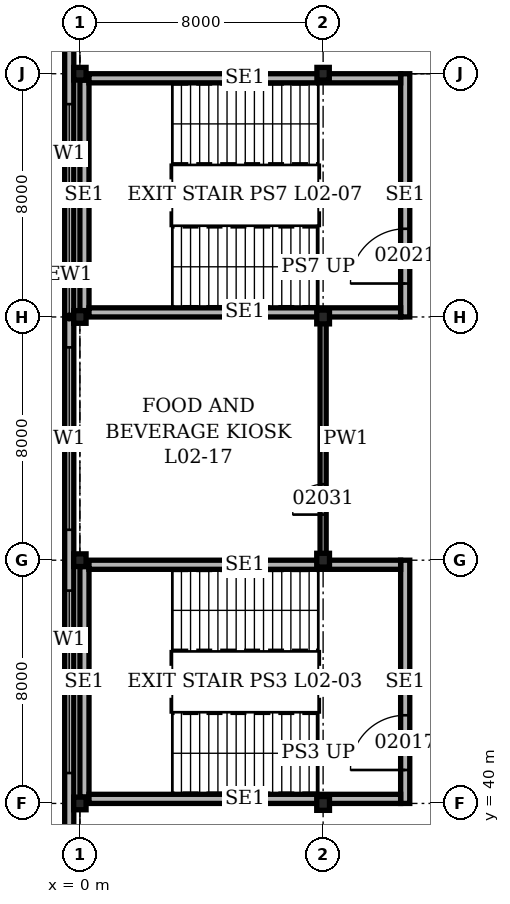
"""IFC4 building model, lengths in metres.
Left out: names, types, materials, properties, quantities, classifications, styles, units other than length and angle.
Written with IfcOpenShell. Run it as: python <this file> out.ifc"""

import sys

from ifc_helpers import new_model, si_unit, direction, frame, frame_2d, origin, origin_2d, place, context, subcontext, project, spatial, rectangle, i_section, extrude, element, fill, save


model = new_model("IFC4")
c1 = context("Model", 3, precision=1e-05, world=origin(), true_north=direction((0.0, 1.0)))
c2 = subcontext(c1, "Body", "Model", "MODEL_VIEW")
j1 = project(units=[si_unit("LENGTHUNIT", "METRE"), si_unit("PLANEANGLEUNIT", "RADIAN")], contexts=[c1])
p1 = place(None, origin())
s1 = spatial("IfcSite", under=j1, at=p1, CompositionType="ELEMENT")
p2 = place(p1, origin())
s2 = spatial("IfcBuilding", under=s1, at=p2, CompositionType="ELEMENT")
p3 = place(p2, frame((0.0, 0.0, 9.9)))
s3 = spatial("IfcBuildingStorey", under=s2, at=p3, CompositionType="ELEMENT", Elevation=9.9)
for number, where, z_axis, x_axis in (
    (1, (0.0, 40.0, 0.0), (0.0, 0.0, 1.0), (1.0, 0.0, 0.0)),
    (2, (0.0, 48.0, 0.0), (0.0, 0.0, 1.0), (1.0, 0.0, 0.0)),
    (3, (0.0, 56.0, 0.0), (0.0, 0.0, 1.0), (1.0, 0.0, 0.0)),
    (4, (0.0, 64.0, 0.0), (0.0, 0.0, 1.0), (1.0, 0.0, 0.0)),
):
    element("IfcColumn", number, at=place(p3, frame(where, z_axis=z_axis, x_axis=x_axis)), inside=s3, PredefinedType="COLUMN", context=c2, shape_type="SweptSolid", body=[
        extrude(i_section(OverallWidth=0.406, OverallDepth=0.417, WebThickness=0.03, FlangeThickness=0.048, at=origin_2d()), origin(), (0.0, 0.0, 1.0), 5.0),
    ])
for number, where, z_axis, x_axis in (
    (5, (8.0, 40.0, 0.0), (0.0, 0.0, 1.0), (1.0, 0.0, 0.0)),
    (6, (8.0, 48.0, 0.0), (0.0, 0.0, 1.0), (1.0, 0.0, 0.0)),
    (7, (8.0, 56.0, 0.0), (0.0, 0.0, 1.0), (1.0, 0.0, 0.0)),
):
    element("IfcColumn", number, at=place(p3, frame(where, z_axis=z_axis, x_axis=x_axis)), inside=s3, PredefinedType="COLUMN", context=c2, shape_type="SweptSolid", body=[
        extrude(i_section(OverallWidth=0.419, OverallDepth=0.455, WebThickness=0.042, FlangeThickness=0.068, at=origin_2d()), origin(), (0.0, 0.0, 1.0), 5.0),
    ])
p4 = place(p3, frame((8.0, 64.0, 0.0), z_axis=(0.0, 0.0, 1.0), x_axis=(1.0, 0.0, 0.0)))
e8 = element("IfcColumn", 8, at=p4, inside=s3, PredefinedType="COLUMN", context=c2, shape_type="SweptSolid", body=[
    extrude(i_section(OverallWidth=0.406, OverallDepth=0.417, WebThickness=0.03, FlangeThickness=0.048, at=origin_2d()), origin(), (0.0, 0.0, 1.0), 5.0),
])
p5 = place(p3, frame((-0.35, 112.35, 0.0), z_axis=(0.0, 0.0, 1.0), x_axis=(0.0, -1.0, 0.0)))
e9 = element("IfcWall", 9, at=p5, inside=s3, PredefinedType="SOLIDWALL", context=c2, shape_type="SweptSolid", body=[
    extrude(rectangle(XDim=112.7, YDim=0.3, at=frame_2d((56.35, 0.0))), origin(), (0.0, 0.0, 1.0), 5.0),
])
p6 = place(p5, frame((1.35, 0.0, 1.0)))
e10 = element("IfcOpeningElement", 10, at=p6, cuts=e9, PredefinedType="OPENING", context=c2, shape_type="SweptSolid", body=[
    extrude(rectangle(XDim=6.0, YDim=1.5, at=frame_2d((3.0, 0.75))), frame((0.0, 0.16, 0.0), z_axis=(0.0, -1.0, 0.0), x_axis=(1.0, 0.0, 0.0)), (0.0, 0.0, 1.0), 0.32),
])
p7 = place(p5, frame((9.35, 0.0, 1.0)))
e11 = element("IfcOpeningElement", 11, at=p7, cuts=e9, PredefinedType="OPENING", context=c2, shape_type="SweptSolid", body=[
    extrude(rectangle(XDim=6.0, YDim=1.5, at=frame_2d((3.0, 0.75))), frame((0.0, 0.16, 0.0), z_axis=(0.0, -1.0, 0.0), x_axis=(1.0, 0.0, 0.0)), (0.0, 0.0, 1.0), 0.32),
])
p8 = place(p5, frame((17.35, 0.0, 1.0)))
e12 = element("IfcOpeningElement", 12, at=p8, cuts=e9, PredefinedType="OPENING", context=c2, shape_type="SweptSolid", body=[
    extrude(rectangle(XDim=6.0, YDim=1.5, at=frame_2d((3.0, 0.75))), frame((0.0, 0.16, 0.0), z_axis=(0.0, -1.0, 0.0), x_axis=(1.0, 0.0, 0.0)), (0.0, 0.0, 1.0), 0.32),
])
p9 = place(p5, frame((25.35, 0.0, 1.0)))
e13 = element("IfcOpeningElement", 13, at=p9, cuts=e9, PredefinedType="OPENING", context=c2, shape_type="SweptSolid", body=[
    extrude(rectangle(XDim=6.0, YDim=1.5, at=frame_2d((3.0, 0.75))), frame((0.0, 0.16, 0.0), z_axis=(0.0, -1.0, 0.0), x_axis=(1.0, 0.0, 0.0)), (0.0, 0.0, 1.0), 0.32),
])
p10 = place(p5, frame((33.35, 0.0, 1.0)))
e14 = element("IfcOpeningElement", 14, at=p10, cuts=e9, PredefinedType="OPENING", context=c2, shape_type="SweptSolid", body=[
    extrude(rectangle(XDim=6.0, YDim=1.5, at=frame_2d((3.0, 0.75))), frame((0.0, 0.16, 0.0), z_axis=(0.0, -1.0, 0.0), x_axis=(1.0, 0.0, 0.0)), (0.0, 0.0, 1.0), 0.32),
])
p11 = place(p5, frame((41.35, 0.0, 1.0)))
e15 = element("IfcOpeningElement", 15, at=p11, cuts=e9, PredefinedType="OPENING", context=c2, shape_type="SweptSolid", body=[
    extrude(rectangle(XDim=6.0, YDim=1.5, at=frame_2d((3.0, 0.75))), frame((0.0, 0.16, 0.0), z_axis=(0.0, -1.0, 0.0), x_axis=(1.0, 0.0, 0.0)), (0.0, 0.0, 1.0), 0.32),
])
p12 = place(p5, frame((49.35, 0.0, 1.0)))
e16 = element("IfcOpeningElement", 16, at=p12, cuts=e9, PredefinedType="OPENING", context=c2, shape_type="SweptSolid", body=[
    extrude(rectangle(XDim=6.0, YDim=1.5, at=frame_2d((3.0, 0.75))), frame((0.0, 0.16, 0.0), z_axis=(0.0, -1.0, 0.0), x_axis=(1.0, 0.0, 0.0)), (0.0, 0.0, 1.0), 0.32),
])
p13 = place(p5, frame((57.35, 0.0, 1.0)))
e17 = element("IfcOpeningElement", 17, at=p13, cuts=e9, PredefinedType="OPENING", context=c2, shape_type="SweptSolid", body=[
    extrude(rectangle(XDim=6.0, YDim=1.5, at=frame_2d((3.0, 0.75))), frame((0.0, 0.16, 0.0), z_axis=(0.0, -1.0, 0.0), x_axis=(1.0, 0.0, 0.0)), (0.0, 0.0, 1.0), 0.32),
])
p14 = place(p5, frame((65.35, 0.0, 1.0)))
e18 = element("IfcOpeningElement", 18, at=p14, cuts=e9, PredefinedType="OPENING", context=c2, shape_type="SweptSolid", body=[
    extrude(rectangle(XDim=6.0, YDim=1.5, at=frame_2d((3.0, 0.75))), frame((0.0, 0.16, 0.0), z_axis=(0.0, -1.0, 0.0), x_axis=(1.0, 0.0, 0.0)), (0.0, 0.0, 1.0), 0.32),
])
p15 = place(p5, frame((73.35, 0.0, 1.0)))
e19 = element("IfcOpeningElement", 19, at=p15, cuts=e9, PredefinedType="OPENING", context=c2, shape_type="SweptSolid", body=[
    extrude(rectangle(XDim=6.0, YDim=1.5, at=frame_2d((3.0, 0.75))), frame((0.0, 0.16, 0.0), z_axis=(0.0, -1.0, 0.0), x_axis=(1.0, 0.0, 0.0)), (0.0, 0.0, 1.0), 0.32),
])
p16 = place(p5, frame((81.35, 0.0, 1.0)))
e20 = element("IfcOpeningElement", 20, at=p16, cuts=e9, PredefinedType="OPENING", context=c2, shape_type="SweptSolid", body=[
    extrude(rectangle(XDim=6.0, YDim=1.5, at=frame_2d((3.0, 0.75))), frame((0.0, 0.16, 0.0), z_axis=(0.0, -1.0, 0.0), x_axis=(1.0, 0.0, 0.0)), (0.0, 0.0, 1.0), 0.32),
])
p17 = place(p5, frame((89.35, 0.0, 1.0)))
e21 = element("IfcOpeningElement", 21, at=p17, cuts=e9, PredefinedType="OPENING", context=c2, shape_type="SweptSolid", body=[
    extrude(rectangle(XDim=6.0, YDim=1.5, at=frame_2d((3.0, 0.75))), frame((0.0, 0.16, 0.0), z_axis=(0.0, -1.0, 0.0), x_axis=(1.0, 0.0, 0.0)), (0.0, 0.0, 1.0), 0.32),
])
p18 = place(p5, frame((97.35, 0.0, 1.0)))
e22 = element("IfcOpeningElement", 22, at=p18, cuts=e9, PredefinedType="OPENING", context=c2, shape_type="SweptSolid", body=[
    extrude(rectangle(XDim=6.0, YDim=1.5, at=frame_2d((3.0, 0.75))), frame((0.0, 0.16, 0.0), z_axis=(0.0, -1.0, 0.0), x_axis=(1.0, 0.0, 0.0)), (0.0, 0.0, 1.0), 0.32),
])
p19 = place(p5, frame((105.35, 0.0, 1.0)))
e23 = element("IfcOpeningElement", 23, at=p19, cuts=e9, PredefinedType="OPENING", context=c2, shape_type="SweptSolid", body=[
    extrude(rectangle(XDim=6.0, YDim=1.5, at=frame_2d((3.0, 0.75))), frame((0.0, 0.16, 0.0), z_axis=(0.0, -1.0, 0.0), x_axis=(1.0, 0.0, 0.0)), (0.0, 0.0, 1.0), 0.32),
])
p20 = place(p3, frame((0.15, 40.208, 0.0), z_axis=(0.0, 0.0, 1.0), x_axis=(0.0, 1.0, 0.0)))
e24 = element("IfcWall", 24, at=p20, inside=s3, PredefinedType="SOLIDWALL", context=c2, shape_type="SweptSolid", body=[
    extrude(rectangle(XDim=7.583, YDim=0.3, at=frame_2d((3.792, 0.0))), origin(), (0.0, 0.0, 1.0), 4.8),
])
p21 = place(p3, frame((10.7, 40.0, 0.0), z_axis=(0.0, 0.0, 1.0), x_axis=(0.0, 1.0, 0.0)))
e25 = element("IfcWall", 25, at=p21, inside=s3, PredefinedType="SOLIDWALL", context=c2, shape_type="SweptSolid", body=[
    extrude(rectangle(XDim=8.0, YDim=0.3, at=frame_2d((4.0, 0.0))), origin(), (0.0, 0.0, 1.0), 4.8),
])
p22 = place(p21, frame((1.1, 0.0, 0.0)))
e26 = element("IfcOpeningElement", 26, at=p22, cuts=e25, PredefinedType="OPENING", context=c2, shape_type="SweptSolid", body=[
    extrude(rectangle(XDim=1.8, YDim=2.1, at=frame_2d((0.9, 1.05))), frame((0.0, 0.16, 0.0), z_axis=(0.0, -1.0, 0.0), x_axis=(1.0, 0.0, 0.0)), (0.0, 0.0, 1.0), 0.32),
])
for number, where, z_axis, x_axis in (
    (27, (0.3, 40.15, 0.0), (0.0, 0.0, 1.0), (1.0, 0.0, 0.0)),
    (28, (0.3, 47.85, 0.0), (0.0, 0.0, 1.0), (1.0, 0.0, 0.0)),
):
    element("IfcWall", number, at=place(p3, frame(where, z_axis=z_axis, x_axis=x_axis)), inside=s3, PredefinedType="SOLIDWALL", context=c2, shape_type="SweptSolid", body=[
        extrude(rectangle(XDim=10.25, YDim=0.3, at=frame_2d((5.125, 0.0))), origin(), (0.0, 0.0, 1.0), 4.8),
    ])
p23 = place(p3, frame((0.15, 56.208, 0.0), z_axis=(0.0, 0.0, 1.0), x_axis=(0.0, 1.0, 0.0)))
e29 = element("IfcWall", 29, at=p23, inside=s3, PredefinedType="SOLIDWALL", context=c2, shape_type="SweptSolid", body=[
    extrude(rectangle(XDim=7.583, YDim=0.3, at=frame_2d((3.792, 0.0))), origin(), (0.0, 0.0, 1.0), 4.8),
])
p24 = place(p3, frame((10.7, 56.0, 0.0), z_axis=(0.0, 0.0, 1.0), x_axis=(0.0, 1.0, 0.0)))
e30 = element("IfcWall", 30, at=p24, inside=s3, PredefinedType="SOLIDWALL", context=c2, shape_type="SweptSolid", body=[
    extrude(rectangle(XDim=8.0, YDim=0.3, at=frame_2d((4.0, 0.0))), origin(), (0.0, 0.0, 1.0), 4.8),
])
p25 = place(p24, frame((1.1, 0.0, 0.0)))
e31 = element("IfcOpeningElement", 31, at=p25, cuts=e30, PredefinedType="OPENING", context=c2, shape_type="SweptSolid", body=[
    extrude(rectangle(XDim=1.8, YDim=2.1, at=frame_2d((0.9, 1.05))), frame((0.0, 0.16, 0.0), z_axis=(0.0, -1.0, 0.0), x_axis=(1.0, 0.0, 0.0)), (0.0, 0.0, 1.0), 0.32),
])
for number, where, z_axis, x_axis in (
    (32, (0.3, 56.15, 0.0), (0.0, 0.0, 1.0), (1.0, 0.0, 0.0)),
    (33, (0.3, 63.85, 0.0), (0.0, 0.0, 1.0), (1.0, 0.0, 0.0)),
):
    element("IfcWall", number, at=place(p3, frame(where, z_axis=z_axis, x_axis=x_axis)), inside=s3, PredefinedType="SOLIDWALL", context=c2, shape_type="SweptSolid", body=[
        extrude(rectangle(XDim=10.25, YDim=0.3, at=frame_2d((5.125, 0.0))), origin(), (0.0, 0.0, 1.0), 4.8),
    ])
p26 = place(p3, frame((8.0, 48.1, 0.0), z_axis=(0.0, 0.0, 1.0), x_axis=(0.0, 1.0, 0.0)))
e34 = element("IfcWall", 34, at=p26, inside=s3, PredefinedType="PARTITIONING", context=c2, shape_type="SweptSolid", body=[
    extrude(rectangle(XDim=7.8, YDim=0.2, at=frame_2d((3.9, 0.0))), origin(), (0.0, 0.0, 1.0), 4.028),
])
p27 = place(p26, frame((1.4, 0.0, 0.0)))
e35 = element("IfcOpeningElement", 35, at=p27, cuts=e34, PredefinedType="OPENING", context=c2, shape_type="SweptSolid", body=[
    extrude(rectangle(XDim=1.0, YDim=2.1, at=frame_2d((0.5, 1.05))), frame((0.0, 0.11, 0.0), z_axis=(0.0, -1.0, 0.0), x_axis=(1.0, 0.0, 0.0)), (0.0, 0.0, 1.0), 0.22),
])
p28 = place(p12, origin())
e36 = element("IfcWindow", 36, at=p28, inside=s3, PartitioningType="SINGLE_PANEL", PredefinedType="WINDOW", context=c2, shape_type="SweptSolid", body=[
    extrude(rectangle(XDim=6.0, YDim=1.5, at=frame_2d((3.0, 0.75))), frame((0.0, 0.03, 0.0), z_axis=(0.0, -1.0, 0.0), x_axis=(1.0, 0.0, 0.0)), (0.0, 0.0, 1.0), 0.06),
])
fill(e16, e36)
p29 = place(p13, origin())
e37 = element("IfcWindow", 37, at=p29, inside=s3, PartitioningType="SINGLE_PANEL", PredefinedType="WINDOW", context=c2, shape_type="SweptSolid", body=[
    extrude(rectangle(XDim=6.0, YDim=1.5, at=frame_2d((3.0, 0.75))), frame((0.0, 0.03, 0.0), z_axis=(0.0, -1.0, 0.0), x_axis=(1.0, 0.0, 0.0)), (0.0, 0.0, 1.0), 0.06),
])
fill(e17, e37)
p30 = place(p14, origin())
e38 = element("IfcWindow", 38, at=p30, inside=s3, PartitioningType="SINGLE_PANEL", PredefinedType="WINDOW", context=c2, shape_type="SweptSolid", body=[
    extrude(rectangle(XDim=6.0, YDim=1.5, at=frame_2d((3.0, 0.75))), frame((0.0, 0.03, 0.0), z_axis=(0.0, -1.0, 0.0), x_axis=(1.0, 0.0, 0.0)), (0.0, 0.0, 1.0), 0.06),
])
fill(e18, e38)
p31 = place(p22, origin())
e39 = element("IfcDoor", 39, at=p31, inside=s3, OperationType="DOUBLE_DOOR_SINGLE_SWING", PredefinedType="DOOR", context=c2, shape_type="SweptSolid", body=[
    extrude(rectangle(XDim=1.8, YDim=2.1, at=frame_2d((0.9, 1.05))), frame((0.0, 0.15, 0.0), z_axis=(0.0, -1.0, 0.0), x_axis=(1.0, 0.0, 0.0)), (0.0, 0.0, 1.0), 0.3),
])
fill(e26, e39)
p32 = place(p25, origin())
e40 = element("IfcDoor", 40, at=p32, inside=s3, OperationType="DOUBLE_DOOR_SINGLE_SWING", PredefinedType="DOOR", context=c2, shape_type="SweptSolid", body=[
    extrude(rectangle(XDim=1.8, YDim=2.1, at=frame_2d((0.9, 1.05))), frame((0.0, 0.15, 0.0), z_axis=(0.0, -1.0, 0.0), x_axis=(1.0, 0.0, 0.0)), (0.0, 0.0, 1.0), 0.3),
])
fill(e31, e40)
p33 = place(p27, origin())
e41 = element("IfcDoor", 41, at=p33, inside=s3, OperationType="SINGLE_SWING_LEFT", PredefinedType="DOOR", context=c2, shape_type="SweptSolid", body=[
    extrude(rectangle(XDim=1.0, YDim=2.1, at=frame_2d((0.5, 1.05))), frame((0.0, 0.1, 0.0), z_axis=(0.0, -1.0, 0.0), x_axis=(1.0, 0.0, 0.0)), (0.0, 0.0, 1.0), 0.199),
])
fill(e35, e41)
save(model, sys.argv[1])
